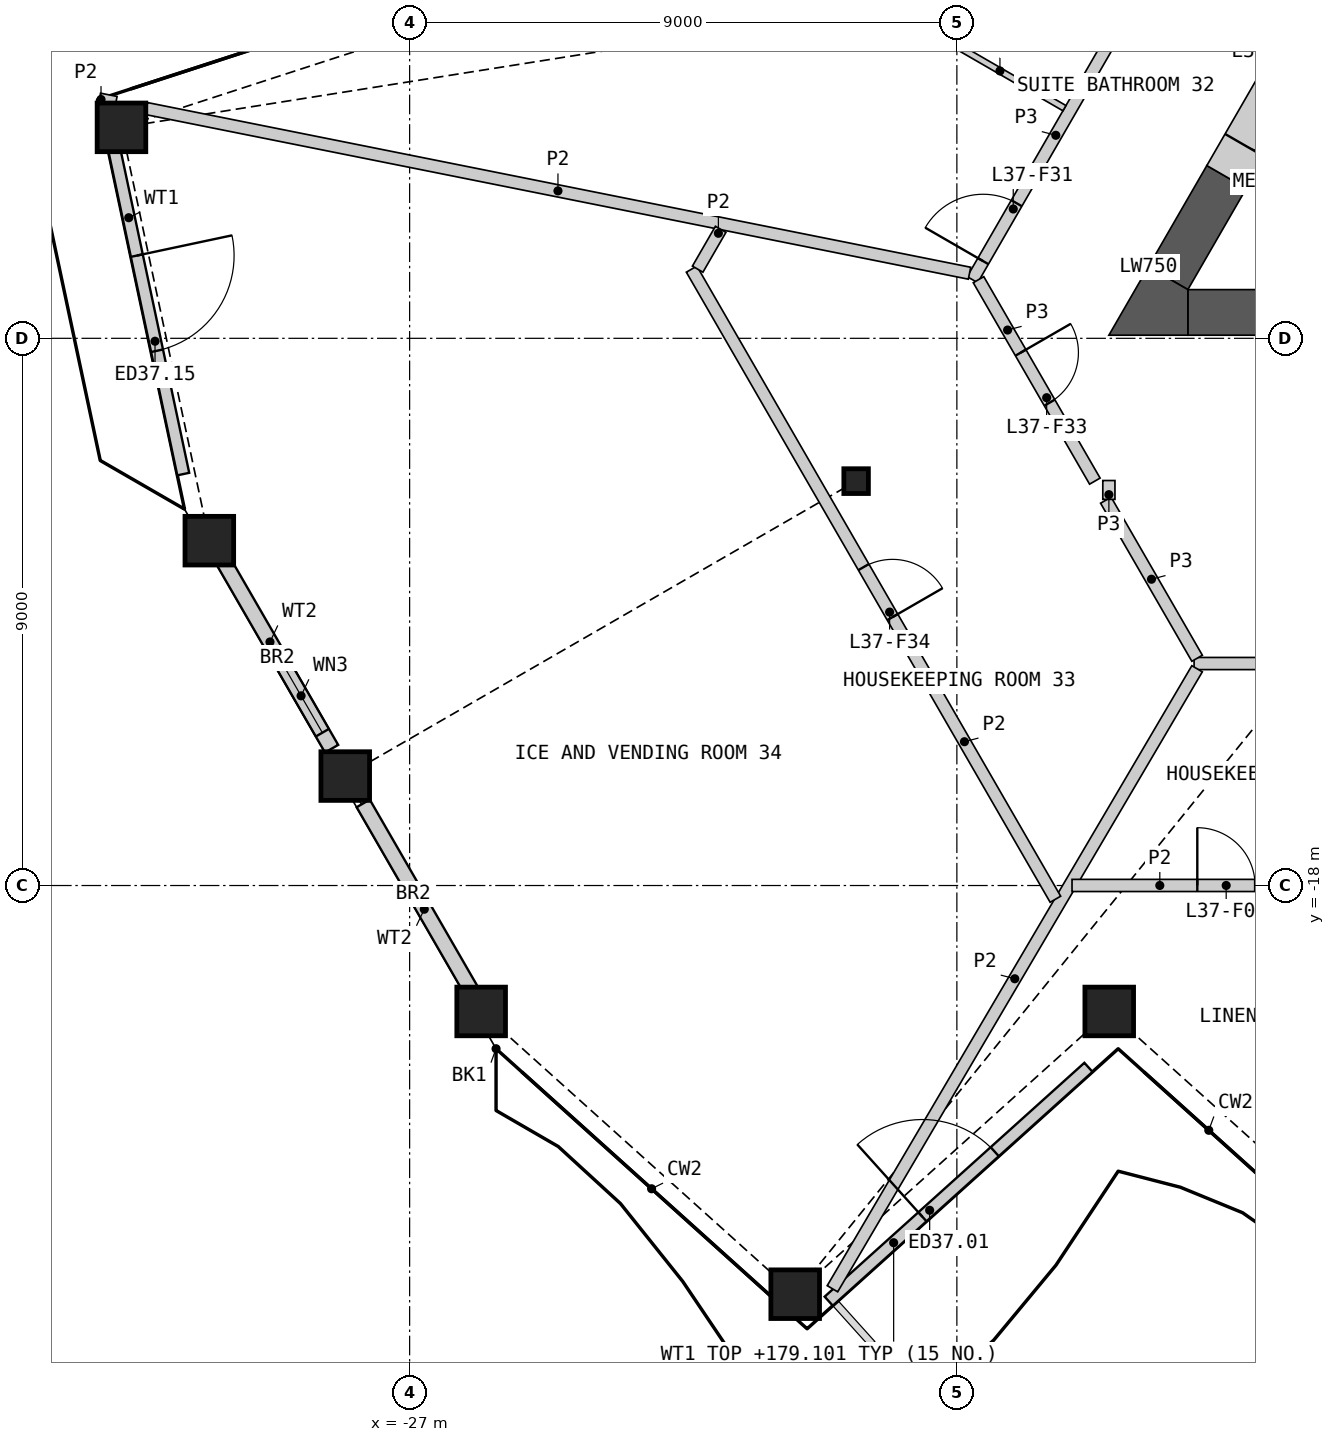
"""IFC4 building model, lengths in metres.
Left out: names, types, materials, properties, quantities, classifications, styles, units other than length and angle.
Written with IfcOpenShell. Run it as: python <this file> out.ifc"""

import sys

from ifc_helpers import new_model, si_unit, direction, frame, frame_2d, origin, origin_2d, place, context, subcontext, project, spatial, polyline, rectangle, hollow_rectangle, i_section, outline, extrude, element, fill, save


model = new_model("IFC4")
c1 = context("Model", 3, precision=1e-05, world=origin(), true_north=direction((0.0, 1.0)))
c2 = subcontext(c1, "Body", "Model", "MODEL_VIEW")
j1 = project(units=[si_unit("LENGTHUNIT", "METRE"), si_unit("PLANEANGLEUNIT", "RADIAN")], contexts=[c1])
p1 = place(None, origin())
s1 = spatial("IfcSite", under=j1, at=p1, CompositionType="ELEMENT")
p2 = place(p1, origin())
s2 = spatial("IfcBuilding", under=s1, at=p2, CompositionType="ELEMENT")
p3 = place(p2, frame((0.0, 0.0, 176.4)))
s3 = spatial("IfcBuildingStorey", under=s2, at=p3, CompositionType="ELEMENT", Elevation=176.4)
for number, where, z_axis, x_axis in (
    (1, (-25.823, -20.071, 0.0), (0.0, 0.0, 1.0), (1.0, 0.0, 0.0)),
    (2, (-20.659, -24.722, 0.0), (0.0, 0.0, 1.0), (1.0, 0.0, 0.0)),
    (3, (-15.494, -20.071, 0.0), (0.0, 0.0, 1.0), (1.0, 0.0, 0.0)),
    (4, (-31.739, -5.53, 0.0), (0.0, 0.0, 1.0), (1.0, 0.0, 0.0)),
    (5, (-30.294, -12.328, 0.0), (0.0, 0.0, 1.0), (1.0, 0.0, 0.0)),
    (6, (-28.059, -16.2, 0.0), (0.0, 0.0, 1.0), (1.0, 0.0, 0.0)),
):
    element("IfcColumn", number, at=place(p3, frame(where, z_axis=z_axis, x_axis=x_axis)), inside=s3, PredefinedType="COLUMN", context=c2, shape_type="SweptSolid", body=[
        extrude(hollow_rectangle(XDim=0.8, YDim=0.8, WallThickness=0.05, at=origin_2d()), origin(), (0.0, 0.0, 1.0), 3.6),
    ])
p4 = place(p3, frame((-19.657, -11.349, 0.0), z_axis=(0.0, 0.0, 1.0), x_axis=(1.0, 0.0, 0.0)))
e7 = element("IfcColumn", 7, at=p4, inside=s3, PredefinedType="COLUMN", context=c2, shape_type="SweptSolid", body=[
    extrude(i_section(OverallWidth=0.404, OverallDepth=0.407, WebThickness=0.027, FlangeThickness=0.044, at=origin_2d()), origin(), (0.0, 0.0, 1.0), 3.6),
])
p5 = place(p3, frame((-20.108, -24.836, 0.0), z_axis=(0.0, 0.0, 1.0), x_axis=(0.74315473474, 0.669119600844, 0.0)))
e8 = element("IfcWall", 8, at=p5, inside=s3, PredefinedType="SOLIDWALL", context=c2, shape_type="SweptSolid", body=[
    extrude(rectangle(XDim=5.748, YDim=0.2, at=frame_2d((2.874, 0.0))), origin(), (0.0, 0.0, 1.0), 2.701),
])
p6 = place(p5, frame((2.074, 0.0, 0.0)))
e9 = element("IfcOpeningElement", 9, at=p6, cuts=e8, PredefinedType="OPENING", context=c2, shape_type="SweptSolid", body=[
    extrude(rectangle(XDim=1.6, YDim=2.4, at=frame_2d((0.8, 1.2))), frame((0.0, 0.11, 0.0), z_axis=(0.0, -1.0, 0.0), x_axis=(1.0, 0.0, 0.0)), (0.0, 0.0, 1.0), 0.22),
])
p7 = place(p3, frame((-31.918, -5.611, 0.0), z_axis=(0.0, 0.0, 1.0), x_axis=(0.207913110781, -0.97814729891, 0.0)))
e10 = element("IfcWall", 10, at=p7, inside=s3, PredefinedType="SOLIDWALL", context=c2, shape_type="SweptSolid", body=[
    extrude(rectangle(XDim=5.748, YDim=0.2, at=frame_2d((2.874, 0.0))), origin(), (0.0, 0.0, 1.0), 2.701),
])
p8 = place(p7, frame((2.074, 0.0, 0.0)))
e11 = element("IfcOpeningElement", 11, at=p8, cuts=e10, PredefinedType="OPENING", context=c2, shape_type="SweptSolid", body=[
    extrude(rectangle(XDim=1.6, YDim=2.4, at=frame_2d((0.8, 1.2))), frame((0.0, 0.11, 0.0), z_axis=(0.0, -1.0, 0.0), x_axis=(1.0, 0.0, 0.0)), (0.0, 0.0, 1.0), 0.22),
])
p9 = place(p3, frame((-30.31, -12.239, 0.0), z_axis=(0.0, 0.0, 1.0), x_axis=(0.500005680777, -0.866022123962, 0.0)))
e12 = element("IfcWall", 12, at=p9, inside=s3, PredefinedType="SOLIDWALL", context=c2, shape_type="SweptSolid", body=[
    extrude(rectangle(XDim=4.054, YDim=0.25, at=frame_2d((2.027, 0.0))), origin(), (0.0, 0.0, 1.0), 2.701),
])
p10 = place(p9, frame((2.35, 0.0, 1.7)))
e13 = element("IfcOpeningElement", 13, at=p10, cuts=e12, PredefinedType="OPENING", context=c2, shape_type="SweptSolid", body=[
    extrude(rectangle(XDim=1.4, YDim=0.8, at=frame_2d((0.7, 0.4))), frame((0.0, 0.135, 0.0), z_axis=(0.0, -1.0, 0.0), x_axis=(1.0, 0.0, 0.0)), (0.0, 0.0, 1.0), 0.27),
])
p11 = place(p3, frame((-27.764, -16.65, 0.0), z_axis=(0.0, 0.0, 1.0), x_axis=(0.500039726511, -0.866002466458, 0.0)))
e14 = element("IfcWall", 14, at=p11, inside=s3, PredefinedType="SOLIDWALL", context=c2, shape_type="SweptSolid", body=[
    extrude(rectangle(XDim=4.019, YDim=0.25, at=frame_2d((2.009, 0.0))), origin(), (0.0, 0.0, 1.0), 2.701),
])
p12 = place(p3, frame((-14.201, -8.574, 0.0), z_axis=(0.0, 0.0, 1.0), x_axis=(1.0, 0.0, 0.0)))
e15 = element("IfcWall", 15, at=p12, inside=s3, PredefinedType="SHEAR", context=c2, shape_type="SweptSolid", body=[
    extrude(rectangle(XDim=6.785, YDim=0.75, at=frame_2d((3.393, 0.0))), origin(), (0.0, 0.0, 1.0), 3.25),
])
p13 = place(p3, frame((-13.564, -6.346, 0.0), z_axis=(0.0, 0.0, 1.0), x_axis=(-0.499989888488, -0.86603124159, 0.0)))
e16 = element("IfcWall", 16, at=p13, inside=s3, PredefinedType="SHEAR", context=c2, shape_type="SweptSolid", body=[
    extrude(rectangle(XDim=1.923, YDim=0.75, at=frame_2d((0.961, 0.0))), origin(), (0.0, 0.0, 1.0), 3.25),
])
p14 = place(p3, origin())
e17 = element("IfcWall", 17, at=p14, inside=s3, PredefinedType="SHEAR", context=c2, shape_type="SweptSolid", body=[
    extrude(outline(polyline([(-14.851, -7.824), (-14.201, -8.199), (-14.201, -8.949), (-15.5, -8.949), (-14.851, -7.824)])), origin(), (0.0, 0.0, 1.0), 3.25),
])
p15 = place(p3, frame((-12.464, -4.441, 0.0), z_axis=(0.0, 0.0, 1.0), x_axis=(-0.499994660107, -0.866028486751, 0.0)))
e18 = element("IfcWall", 18, at=p15, inside=s3, PredefinedType="SHEAR", context=c2, shape_type="SweptSolid", body=[
    extrude(rectangle(XDim=2.2, YDim=0.75, at=frame_2d((1.1, 0.0))), origin(), (0.0, 0.0, 1.0), 3.25),
])
p16 = place(p15, frame((0.6, 0.0, 0.0)))
e19 = element("IfcOpeningElement", 19, at=p16, cuts=e18, PredefinedType="OPENING", context=c2, shape_type="SweptSolid", body=[
    extrude(rectangle(XDim=1.0, YDim=2.1, at=frame_2d((0.5, 1.05))), frame((0.0, 0.385, 0.0), z_axis=(0.0, -1.0, 0.0), x_axis=(1.0, 0.0, 0.0)), (0.0, 0.0, 1.0), 0.77),
])
p17 = place(p3, frame((-14.099, -14.349, 0.0), z_axis=(0.0, 0.0, 1.0), x_axis=(1.0, 0.0, 0.0)))
e20 = element("IfcWall", 20, at=p17, inside=s3, PredefinedType="PARTITIONING", context=c2, shape_type="SweptSolid", body=[
    extrude(rectangle(XDim=28.198, YDim=0.2, at=frame_2d((14.099, 0.0))), origin(), (0.0, 0.0, 1.0), 3.25),
])
p18 = place(p17, frame((1.552, 0.0, 0.0)))
e21 = element("IfcOpeningElement", 21, at=p18, cuts=e20, PredefinedType="OPENING", context=c2, shape_type="SweptSolid", body=[
    extrude(rectangle(XDim=0.95, YDim=2.1, at=frame_2d((0.475, 1.05))), frame((0.0, 0.11, 0.0), z_axis=(0.0, -1.0, 0.0), x_axis=(1.0, 0.0, 0.0)), (0.0, 0.0, 1.0), 0.22),
])
p19 = place(p17, frame((7.677, 0.0, 0.0)))
e22 = element("IfcOpeningElement", 22, at=p19, cuts=e20, PredefinedType="OPENING", context=c2, shape_type="SweptSolid", body=[
    extrude(rectangle(XDim=1.0, YDim=2.1, at=frame_2d((0.5, 1.05))), frame((0.0, 0.11, 0.0), z_axis=(0.0, -1.0, 0.0), x_axis=(1.0, 0.0, 0.0)), (0.0, 0.0, 1.0), 0.22),
])
p20 = place(p17, frame((9.283, 0.0, 0.0)))
e23 = element("IfcOpeningElement", 23, at=p20, cuts=e20, PredefinedType="OPENING", context=c2, shape_type="SweptSolid", body=[
    extrude(rectangle(XDim=1.0, YDim=2.1, at=frame_2d((0.5, 1.05))), frame((0.0, 0.11, 0.0), z_axis=(0.0, -1.0, 0.0), x_axis=(1.0, 0.0, 0.0)), (0.0, 0.0, 1.0), 0.22),
])
p21 = place(p17, frame((17.915, 0.0, 0.0)))
e24 = element("IfcOpeningElement", 24, at=p21, cuts=e20, PredefinedType="OPENING", context=c2, shape_type="SweptSolid", body=[
    extrude(rectangle(XDim=1.0, YDim=2.1, at=frame_2d((0.5, 1.05))), frame((0.0, 0.11, 0.0), z_axis=(0.0, -1.0, 0.0), x_axis=(1.0, 0.0, 0.0)), (0.0, 0.0, 1.0), 0.22),
])
p22 = place(p17, frame((19.521, 0.0, 0.0)))
e25 = element("IfcOpeningElement", 25, at=p22, cuts=e20, PredefinedType="OPENING", context=c2, shape_type="SweptSolid", body=[
    extrude(rectangle(XDim=1.0, YDim=2.1, at=frame_2d((0.5, 1.05))), frame((0.0, 0.11, 0.0), z_axis=(0.0, -1.0, 0.0), x_axis=(1.0, 0.0, 0.0)), (0.0, 0.0, 1.0), 0.22),
])
p23 = place(p17, frame((25.696, 0.0, 0.0)))
e26 = element("IfcOpeningElement", 26, at=p23, cuts=e20, PredefinedType="OPENING", context=c2, shape_type="SweptSolid", body=[
    extrude(rectangle(XDim=0.95, YDim=2.1, at=frame_2d((0.475, 1.05))), frame((0.0, 0.11, 0.0), z_axis=(0.0, -1.0, 0.0), x_axis=(1.0, 0.0, 0.0)), (0.0, 0.0, 1.0), 0.22),
])
p24 = place(p3, frame((-17.744, -8.035, 0.0), z_axis=(0.0, 0.0, 1.0), x_axis=(0.500007607708, 0.866021011428, 0.0)))
e27 = element("IfcWall", 27, at=p24, inside=s3, PredefinedType="PARTITIONING", context=c2, shape_type="SweptSolid", body=[
    extrude(rectangle(XDim=5.484, YDim=0.2, at=frame_2d((2.742, 0.0))), origin(), (0.0, 0.0, 1.0), 3.25),
])
p25 = place(p24, frame((0.352, 0.0, 0.0)))
e28 = element("IfcOpeningElement", 28, at=p25, cuts=e27, PredefinedType="OPENING", context=c2, shape_type="SweptSolid", body=[
    extrude(rectangle(XDim=1.1, YDim=2.1, at=frame_2d((0.55, 1.05))), frame((0.0, 0.11, 0.0), z_axis=(0.0, -1.0, 0.0), x_axis=(1.0, 0.0, 0.0)), (0.0, 0.0, 1.0), 0.22),
])
p26 = place(p3, frame((-17.644, -8.035, 0.0), z_axis=(0.0, 0.0, 1.0), x_axis=(0.499961815444, -0.866047448526, 0.0)))
e29 = element("IfcWall", 29, at=p26, inside=s3, PredefinedType="PARTITIONING", context=c2, shape_type="SweptSolid", body=[
    extrude(rectangle(XDim=3.826, YDim=0.2, at=frame_2d((1.913, 0.0))), origin(), (0.0, 0.0, 1.0), 3.25),
])
p27 = place(p26, frame((1.386, 0.0, 0.0)))
e30 = element("IfcOpeningElement", 30, at=p27, cuts=e29, PredefinedType="OPENING", context=c2, shape_type="SweptSolid", body=[
    extrude(rectangle(XDim=0.95, YDim=2.1, at=frame_2d((0.475, 1.05))), frame((0.0, 0.11, 0.0), z_axis=(0.0, -1.0, 0.0), x_axis=(1.0, 0.0, 0.0)), (0.0, 0.0, 1.0), 0.22),
])
p28 = place(p3, frame((-15.55, -11.662, 0.0), z_axis=(0.0, 0.0, 1.0), x_axis=(0.500048608389, -0.865997337899, 0.0)))
e31 = element("IfcWall", 31, at=p28, inside=s3, PredefinedType="PARTITIONING", context=c2, shape_type="SweptSolid", body=[
    extrude(rectangle(XDim=3.002, YDim=0.2, at=frame_2d((1.501, 0.0))), origin(), (0.0, 0.0, 1.0), 3.25),
])
p29 = place(p3, frame((-15.5, -11.649, 0.0), z_axis=(0.0, 0.0, 1.0), x_axis=(0.0, 1.0, 0.0)))
e32 = element("IfcWall", 32, at=p29, inside=s3, PredefinedType="PARTITIONING", context=c2, shape_type="SweptSolid", body=[
    extrude(rectangle(XDim=0.31, YDim=0.2, at=frame_2d((0.155, 0.0))), origin(), (0.0, 0.0, 1.0), 3.25),
])
p30 = place(p3, frame((-31.329, -5.221, 0.0), z_axis=(0.0, 0.0, 1.0), x_axis=(0.980565709097, -0.196190953266, 0.0)))
e33 = element("IfcWall", 33, at=p30, inside=s3, PredefinedType="PARTITIONING", context=c2, shape_type="SweptSolid", body=[
    extrude(rectangle(XDim=13.805, YDim=0.2, at=frame_2d((6.903, 0.0))), origin(), (0.0, 0.0, 1.0), 2.404),
])
p31 = place(p3, frame((-20.046, -24.632, 0.0), z_axis=(0.0, 0.0, 1.0), x_axis=(0.50691549935, 0.86199575203, 0.0)))
e34 = element("IfcWall", 34, at=p31, inside=s3, PredefinedType="PARTITIONING", context=c2, shape_type="SweptSolid", body=[
    extrude(rectangle(XDim=11.83, YDim=0.2, at=frame_2d((5.915, 0.0))), origin(), (0.0, 0.0, 1.0), 2.404),
])
p32 = place(p3, frame((-22.363, -7.862, 0.0), z_axis=(0.0, 0.0, 1.0), x_axis=(0.500009728207, -0.866019787128, 0.0)))
e35 = element("IfcWall", 35, at=p32, inside=s3, PredefinedType="PARTITIONING", context=c2, shape_type="SweptSolid", body=[
    extrude(rectangle(XDim=11.967, YDim=0.2, at=frame_2d((5.983, 0.0))), origin(), (0.0, 0.0, 1.0), 2.404),
])
p33 = place(p32, frame((5.658, 0.0, 0.0)))
e36 = element("IfcOpeningElement", 36, at=p33, cuts=e35, PredefinedType="OPENING", context=c2, shape_type="SweptSolid", body=[
    extrude(rectangle(XDim=0.95, YDim=2.1, at=frame_2d((0.475, 1.05))), frame((0.0, 0.11, 0.0), z_axis=(0.0, -1.0, 0.0), x_axis=(1.0, 0.0, 0.0)), (0.0, 0.0, 1.0), 0.22),
])
p34 = place(p3, frame((-16.106, -17.999, 0.0), z_axis=(0.0, 0.0, 1.0), x_axis=(1.0, 0.0, 0.0)))
e37 = element("IfcWall", 37, at=p34, inside=s3, PredefinedType="PARTITIONING", context=c2, shape_type="SweptSolid", body=[
    extrude(rectangle(XDim=5.775, YDim=0.2, at=frame_2d((2.887, 0.0))), origin(), (0.0, 0.0, 1.0), 2.404),
])
p35 = place(p34, frame((2.06, 0.0, 0.0)))
e38 = element("IfcOpeningElement", 38, at=p35, cuts=e37, PredefinedType="OPENING", context=c2, shape_type="SweptSolid", body=[
    extrude(rectangle(XDim=0.95, YDim=2.1, at=frame_2d((0.475, 1.05))), frame((0.0, 0.11, 0.0), z_axis=(0.0, -1.0, 0.0), x_axis=(1.0, 0.0, 0.0)), (0.0, 0.0, 1.0), 0.22),
])
p36 = place(p3, frame((-22.263, -7.862, 0.0), z_axis=(0.0, 0.0, 1.0), x_axis=(0.499852814723, 0.866110364569, 0.0)))
e39 = element("IfcWall", 39, at=p36, inside=s3, PredefinedType="PARTITIONING", context=c2, shape_type="SweptSolid", body=[
    extrude(rectangle(XDim=0.757, YDim=0.2, at=frame_2d((0.378, 0.0))), origin(), (0.0, 0.0, 1.0), 2.404),
])
p37 = place(p3, frame((-32.103, -5.066, 0.0), z_axis=(0.0, 0.0, 1.0), x_axis=(0.980512850695, -0.19645495571, 0.0)))
e40 = element("IfcWall", 40, at=p37, inside=s3, PredefinedType="PARTITIONING", context=c2, shape_type="SweptSolid", body=[
    extrude(rectangle(XDim=0.277, YDim=0.2, at=frame_2d((0.139, 0.0))), origin(), (0.0, 0.0, 1.0), 2.404),
])
p38 = place(p3, frame((-18.353, -3.99, 0.0), z_axis=(0.0, 0.0, 1.0), x_axis=(0.866057815567, -0.499943856944, 0.0)))
e41 = element("IfcWall", 41, at=p38, inside=s3, PredefinedType="PARTITIONING", context=c2, shape_type="SweptSolid", body=[
    extrude(rectangle(XDim=2.45, YDim=0.1, at=frame_2d((1.225, 0.0))), origin(), (0.0, 0.0, 1.0), 2.404),
])
p39 = place(p6, origin())
e42 = element("IfcDoor", 42, at=p39, inside=s3, OperationType="DOUBLE_DOOR_SINGLE_SWING", PredefinedType="DOOR", context=c2, shape_type="SweptSolid", body=[
    extrude(rectangle(XDim=1.6, YDim=2.4, at=frame_2d((0.8, 1.2))), frame((0.0, 0.025, 0.0), z_axis=(0.0, -1.0, 0.0), x_axis=(1.0, 0.0, 0.0)), (0.0, 0.0, 1.0), 0.05),
])
fill(e9, e42)
p40 = place(p8, origin())
e43 = element("IfcDoor", 43, at=p40, inside=s3, OperationType="DOUBLE_DOOR_SINGLE_SWING", PredefinedType="DOOR", context=c2, shape_type="SweptSolid", body=[
    extrude(rectangle(XDim=1.6, YDim=2.4, at=frame_2d((0.8, 1.2))), frame((0.0, 0.025, 0.0), z_axis=(0.0, -1.0, 0.0), x_axis=(1.0, 0.0, 0.0)), (0.0, 0.0, 1.0), 0.05),
])
fill(e11, e43)
p41 = place(p10, origin())
e44 = element("IfcWindow", 44, at=p41, inside=s3, PartitioningType="SINGLE_PANEL", PredefinedType="WINDOW", context=c2, shape_type="SweptSolid", body=[
    extrude(rectangle(XDim=1.4, YDim=0.8, at=frame_2d((0.7, 0.4))), frame((0.0, 0.03, 0.0), z_axis=(0.0, -1.0, 0.0), x_axis=(1.0, 0.0, 0.0)), (0.0, 0.0, 1.0), 0.06),
])
fill(e13, e44)
p42 = place(p16, origin())
e45 = element("IfcDoor", 45, at=p42, inside=s3, OperationType="SINGLE_SWING_LEFT", PredefinedType="DOOR", context=c2, shape_type="SweptSolid", body=[
    extrude(rectangle(XDim=1.0, YDim=2.1, at=frame_2d((0.5, 1.05))), frame((0.0, 0.13, 0.0), z_axis=(0.0, -1.0, 0.0), x_axis=(1.0, 0.0, 0.0)), (0.0, 0.0, 1.0), 0.05),
])
fill(e19, e45)
p43 = place(p35, origin())
e46 = element("IfcDoor", 46, at=p43, inside=s3, OperationType="SINGLE_SWING_LEFT", PredefinedType="DOOR", context=c2, shape_type="SweptSolid", body=[
    extrude(rectangle(XDim=0.95, YDim=2.1, at=frame_2d((0.475, 1.05))), frame((0.0, 0.025, 0.0), z_axis=(0.0, -1.0, 0.0), x_axis=(1.0, 0.0, 0.0)), (0.0, 0.0, 1.0), 0.05),
])
fill(e38, e46)
p44 = place(p25, origin())
e47 = element("IfcDoor", 47, at=p44, inside=s3, OperationType="SINGLE_SWING_LEFT", PredefinedType="DOOR", context=c2, shape_type="SweptSolid", body=[
    extrude(rectangle(XDim=1.1, YDim=2.1, at=frame_2d((0.55, 1.05))), frame((0.0, 0.025, 0.0), z_axis=(0.0, -1.0, 0.0), x_axis=(1.0, 0.0, 0.0)), (0.0, 0.0, 1.0), 0.05),
])
fill(e28, e47)
p45 = place(p27, origin())
e48 = element("IfcDoor", 48, at=p45, inside=s3, OperationType="SINGLE_SWING_LEFT", PredefinedType="DOOR", context=c2, shape_type="SweptSolid", body=[
    extrude(rectangle(XDim=0.95, YDim=2.1, at=frame_2d((0.475, 1.05))), frame((0.0, 0.025, 0.0), z_axis=(0.0, -1.0, 0.0), x_axis=(1.0, 0.0, 0.0)), (0.0, 0.0, 1.0), 0.05),
])
fill(e30, e48)
p46 = place(p33, origin())
e49 = element("IfcDoor", 49, at=p46, inside=s3, OperationType="SINGLE_SWING_RIGHT", PredefinedType="DOOR", context=c2, shape_type="SweptSolid", body=[
    extrude(rectangle(XDim=0.95, YDim=2.1, at=frame_2d((0.475, 1.05))), frame((0.0, 0.025, 0.0), z_axis=(0.0, -1.0, 0.0), x_axis=(1.0, 0.0, 0.0)), (0.0, 0.0, 1.0), 0.05),
])
fill(e36, e49)
save(model, sys.argv[1])
